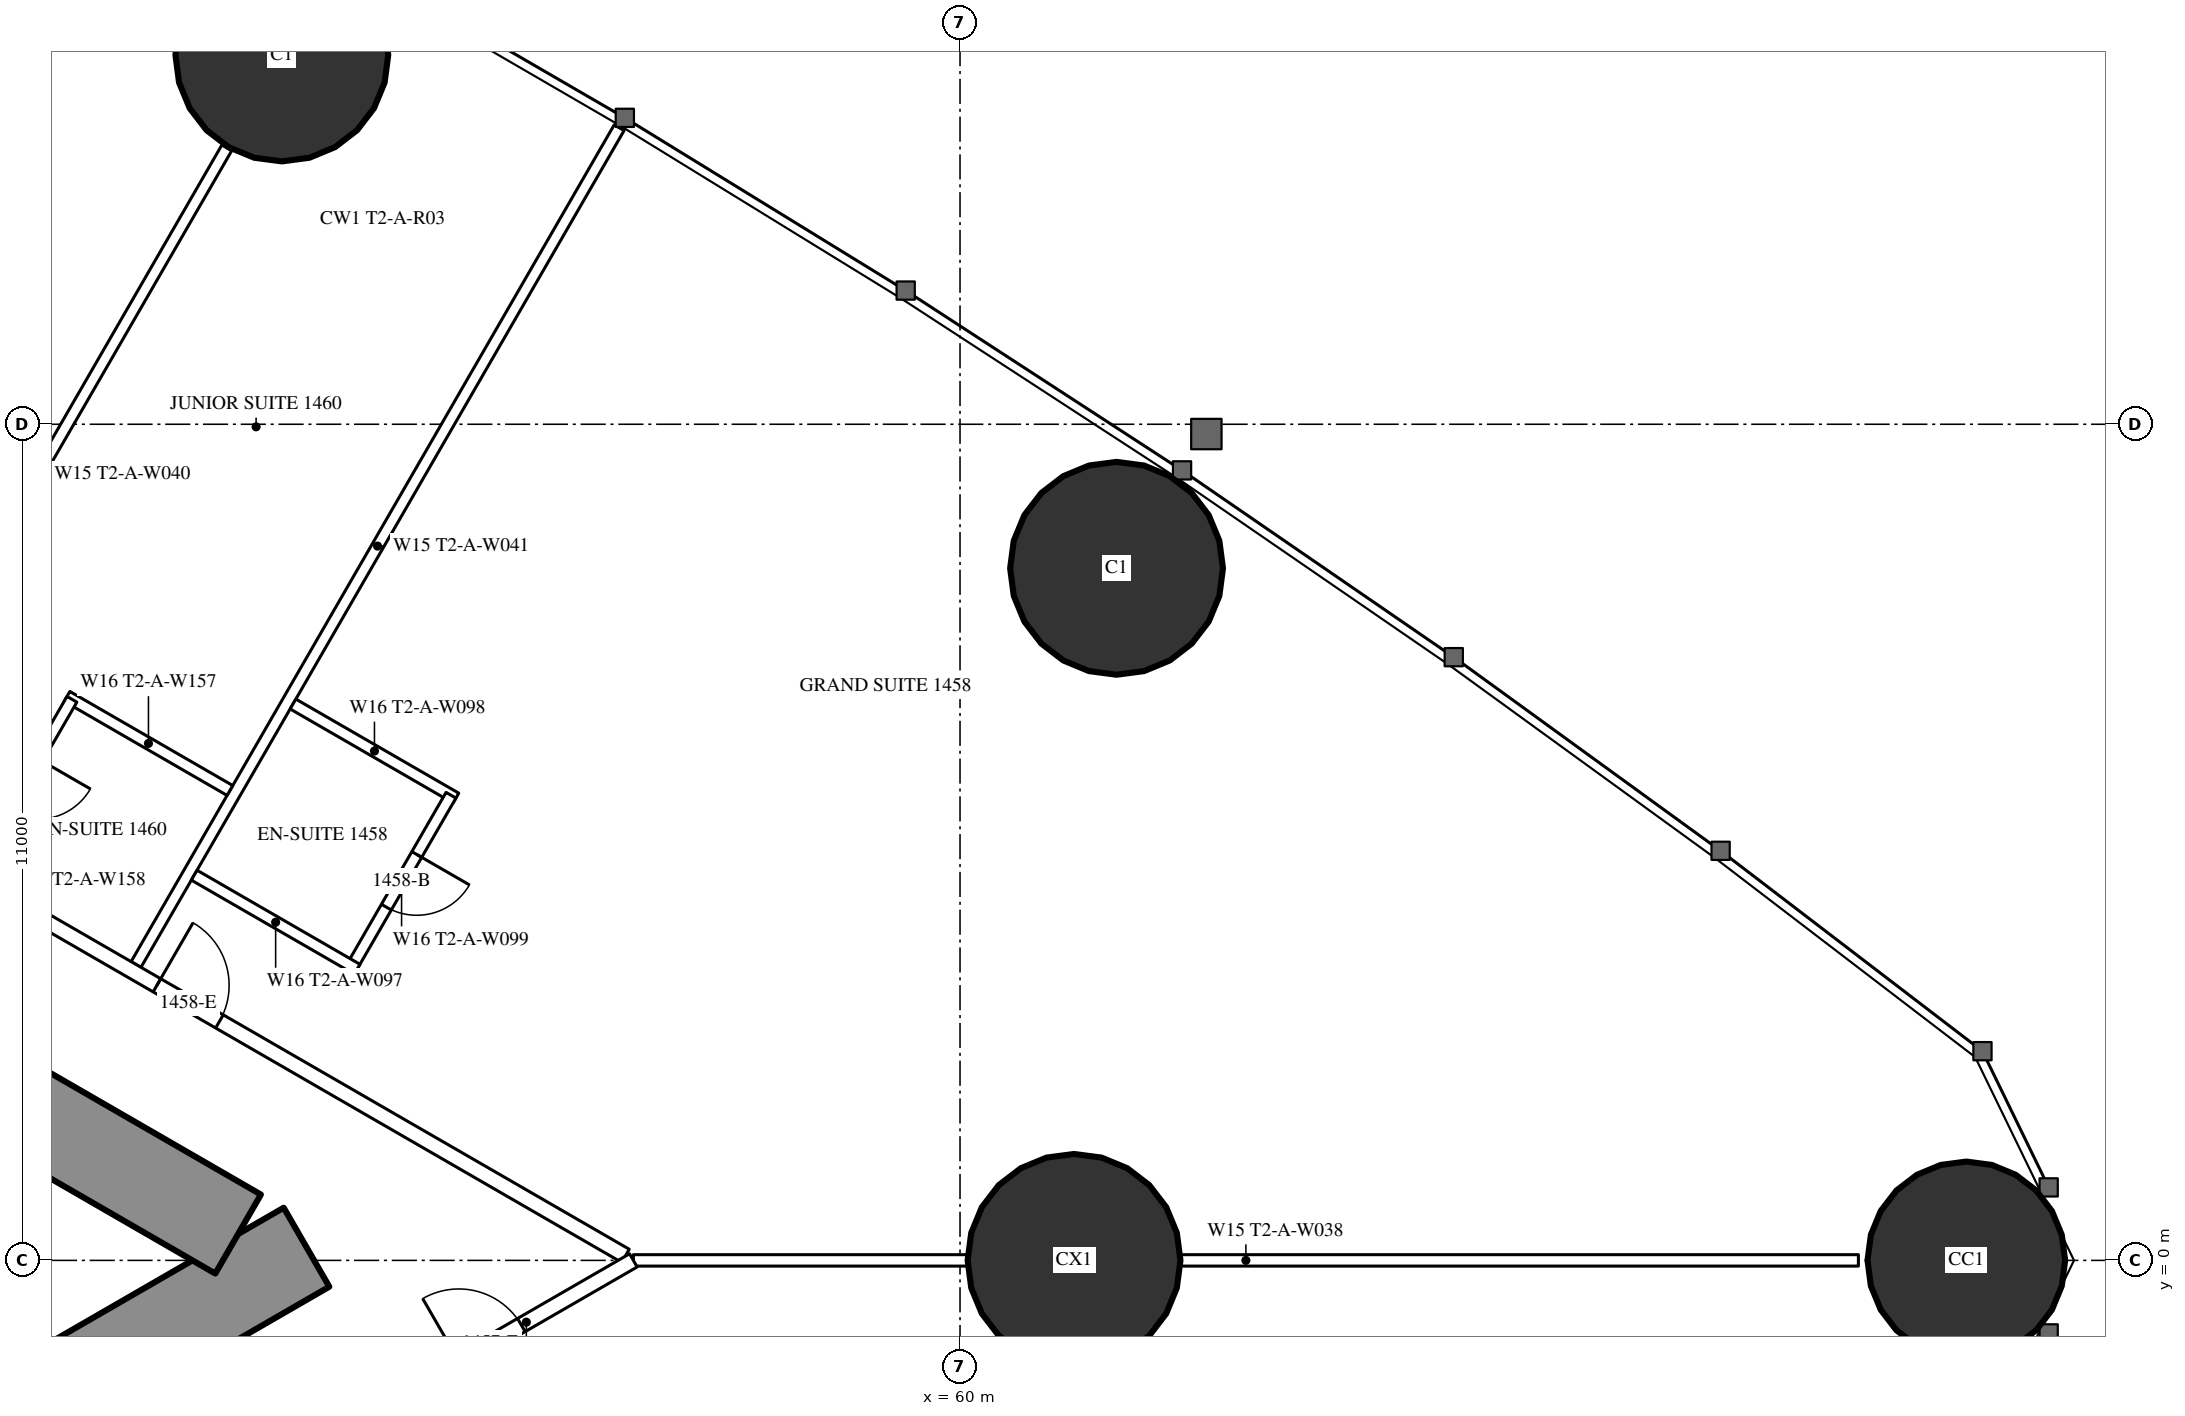
"""IFC4 building model, lengths in metres.
Left out: names, types, materials, properties, quantities, classifications, styles, units other than length and angle.
Written with IfcOpenShell. Run it as: python <this file> out.ifc"""

import sys

from ifc_helpers import new_model, si_unit, direction, frame, frame_2d, origin, origin_2d, place, context, subcontext, project, spatial, rectangle, hollow_circle, extrude, element, fill, save


model = new_model("IFC4")
c1 = context("Model", 3, precision=1e-05, world=origin(), true_north=direction((0.0, 1.0)))
c2 = subcontext(c1, "Body", "Model", "MODEL_VIEW")
j1 = project(units=[si_unit("LENGTHUNIT", "METRE"), si_unit("PLANEANGLEUNIT", "RADIAN")], contexts=[c1])
p1 = place(None, origin())
s1 = spatial("IfcSite", under=j1, at=p1, CompositionType="ELEMENT")
p2 = place(p1, origin())
s2 = spatial("IfcBuilding", under=s1, at=p2, CompositionType="ELEMENT")
p3 = place(p2, frame((0.0, 0.0, 56.5)))
s3 = spatial("IfcBuildingStorey", under=s2, at=p3, CompositionType="ELEMENT", Elevation=56.5)
p4 = place(p3, frame((73.239, 0.0, 0.0), z_axis=(0.0, 0.0, 1.0), x_axis=(1.0, 0.0, 0.0)))
e1 = element("IfcColumn", 1, at=p4, inside=s3, PredefinedType="COLUMN", context=c2, shape_type="SweptSolid", body=[
    extrude(hollow_circle(Radius=1.3, WallThickness=0.1, at=origin_2d()), origin(), (0.0, 0.0, 1.0), 3.5),
])
for number, where, z_axis, x_axis in (
    (2, (62.059, 9.105, 0.0), (0.0, 0.0, 1.0), (1.0, 0.0, 0.0)),
    (3, (51.078, 15.858, 0.0), (0.0, 0.0, 1.0), (1.0, 0.0, 0.0)),
):
    element("IfcColumn", number, at=place(p3, frame(where, z_axis=z_axis, x_axis=x_axis)), inside=s3, PredefinedType="COLUMN", context=c2, shape_type="SweptSolid", body=[
        extrude(hollow_circle(Radius=1.4, WallThickness=0.12, at=origin_2d()), origin(), (0.0, 0.0, 1.0), 3.5),
    ])
p5 = place(p3, frame((61.5, 0.0, 0.0), z_axis=(0.0, 0.0, 1.0), x_axis=(1.0, 0.0, 0.0)))
e4 = element("IfcColumn", 4, at=p5, inside=s3, PredefinedType="COLUMN", context=c2, shape_type="SweptSolid", body=[
    extrude(hollow_circle(Radius=1.4, WallThickness=0.1, at=origin_2d()), origin(), (0.0, 0.0, 1.0), 3.5),
])
p6 = place(p3, frame((27.2, -13.8, 0.0), z_axis=(0.0, 0.0, 1.0), x_axis=(0.866027159892, 0.499996958321, 0.0)))
e5 = element("IfcWall", 5, at=p6, inside=s3, PredefinedType="SHEAR", context=c2, shape_type="SweptSolid", body=[
    extrude(rectangle(XDim=27.947, YDim=1.2, at=frame_2d((13.973, 0.0))), origin(), (0.0, 0.0, 1.0), 3.5),
])
p7 = place(p6, frame((4.6, 0.0, 0.0)))
e6 = element("IfcOpeningElement", 6, at=p7, cuts=e5, PredefinedType="OPENING", context=c2, shape_type="SweptSolid", body=[
    extrude(rectangle(XDim=1.0, YDim=2.2, at=frame_2d((0.5, 1.1))), frame((0.0, 0.61, 0.0), z_axis=(0.0, -1.0, 0.0), x_axis=(1.0, 0.0, 0.0)), (0.0, 0.0, 1.0), 1.22),
])
p8 = place(p6, frame((13.395, 0.0, 0.0)))
e7 = element("IfcOpeningElement", 7, at=p8, cuts=e5, PredefinedType="OPENING", context=c2, shape_type="SweptSolid", body=[
    extrude(rectangle(XDim=1.8, YDim=2.2, at=frame_2d((0.9, 1.1))), frame((0.0, 0.61, 0.0), z_axis=(0.0, -1.0, 0.0), x_axis=(1.0, 0.0, 0.0)), (0.0, 0.0, 1.0), 1.22),
])
p9 = place(p3, frame((27.2, 13.8, 0.0), z_axis=(0.0, 0.0, 1.0), x_axis=(0.866024515034, -0.500001539357, 0.0)))
e8 = element("IfcWall", 8, at=p9, inside=s3, PredefinedType="SHEAR", context=c2, shape_type="SweptSolid", body=[
    extrude(rectangle(XDim=26.907, YDim=1.2, at=frame_2d((13.454, 0.0))), origin(), (0.0, 0.0, 1.0), 3.5),
])
p10 = place(p9, frame((4.6, 0.0, 0.0)))
e9 = element("IfcOpeningElement", 9, at=p10, cuts=e8, PredefinedType="OPENING", context=c2, shape_type="SweptSolid", body=[
    extrude(rectangle(XDim=1.0, YDim=2.2, at=frame_2d((0.5, 1.1))), frame((0.0, 0.61, 0.0), z_axis=(0.0, -1.0, 0.0), x_axis=(1.0, 0.0, 0.0)), (0.0, 0.0, 1.0), 1.22),
])
p11 = place(p9, frame((13.395, 0.0, 0.0)))
e10 = element("IfcOpeningElement", 10, at=p11, cuts=e8, PredefinedType="OPENING", context=c2, shape_type="SweptSolid", body=[
    extrude(rectangle(XDim=1.8, YDim=2.2, at=frame_2d((0.9, 1.1))), frame((0.0, 0.61, 0.0), z_axis=(0.0, -1.0, 0.0), x_axis=(1.0, 0.0, 0.0)), (0.0, 0.0, 1.0), 1.22),
])
p12 = place(p3, frame((45.403, 6.062, 0.0), z_axis=(0.0, 0.0, 1.0), x_axis=(0.500013434677, 0.866017647131, 0.0)))
e11 = element("IfcWall", 11, at=p12, inside=s3, PredefinedType="PARTITIONING", context=c2, shape_type="SweptSolid", body=[
    extrude(rectangle(XDim=9.902, YDim=0.15, at=frame_2d((4.951, 0.0))), origin(), (0.0, 0.0, 1.0), 2.25),
])
p13 = place(p3, frame((49.159, 3.893, 0.0), z_axis=(0.0, 0.0, 1.0), x_axis=(0.499995664361, 0.866027906952, 0.0)))
e12 = element("IfcWall", 12, at=p13, inside=s3, PredefinedType="PARTITIONING", context=c2, shape_type="SweptSolid", body=[
    extrude(rectangle(XDim=12.711, YDim=0.15, at=frame_2d((6.356, 0.0))), origin(), (0.0, 0.0, 1.0), 3.25),
])
p14 = place(p3, frame((55.702, 0.0, 0.0), z_axis=(0.0, 0.0, 1.0), x_axis=(1.0, 0.0, 0.0)))
e13 = element("IfcWall", 13, at=p14, inside=s3, PredefinedType="PARTITIONING", context=c2, shape_type="SweptSolid", body=[
    extrude(rectangle(XDim=16.117, YDim=0.15, at=frame_2d((8.059, 0.0))), origin(), (0.0, 0.0, 1.0), 2.25),
])
p15 = place(p3, frame((36.834, 10.894, 0.0), z_axis=(0.0, 0.0, 1.0), x_axis=(0.866028157229, -0.499995230863, 0.0)))
e14 = element("IfcWall", 14, at=p15, inside=s3, PredefinedType="PARTITIONING", context=c2, shape_type="SweptSolid", body=[
    extrude(rectangle(XDim=21.667, YDim=0.2, at=frame_2d((10.833, 0.0))), origin(), (0.0, 0.0, 1.0), 3.25),
])
p16 = place(p15, frame((14.55, 0.0, 0.0)))
e15 = element("IfcOpeningElement", 15, at=p16, cuts=e14, PredefinedType="OPENING", context=c2, shape_type="SweptSolid", body=[
    extrude(rectangle(XDim=0.95, YDim=2.2, at=frame_2d((0.475, 1.1))), frame((0.0, 0.11, 0.0), z_axis=(0.0, -1.0, 0.0), x_axis=(1.0, 0.0, 0.0)), (0.0, 0.0, 1.0), 0.22),
])
p17 = place(p15, frame((10.5, 0.0, 0.0)))
e16 = element("IfcOpeningElement", 16, at=p17, cuts=e14, PredefinedType="OPENING", context=c2, shape_type="SweptSolid", body=[
    extrude(rectangle(XDim=0.95, YDim=2.2, at=frame_2d((0.475, 1.1))), frame((0.0, 0.11, 0.0), z_axis=(0.0, -1.0, 0.0), x_axis=(1.0, 0.0, 0.0)), (0.0, 0.0, 1.0), 0.22),
])
p18 = place(p15, frame((4.292, 0.0, 0.0)))
e17 = element("IfcOpeningElement", 17, at=p18, cuts=e14, PredefinedType="OPENING", context=c2, shape_type="SweptSolid", body=[
    extrude(rectangle(XDim=1.0, YDim=2.2, at=frame_2d((0.5, 1.1))), frame((0.0, 0.11, 0.0), z_axis=(0.0, -1.0, 0.0), x_axis=(1.0, 0.0, 0.0)), (0.0, 0.0, 1.0), 0.22),
])
p19 = place(p15, frame((0.246, 0.0, 0.0)))
e18 = element("IfcOpeningElement", 18, at=p19, cuts=e14, PredefinedType="OPENING", context=c2, shape_type="SweptSolid", body=[
    extrude(rectangle(XDim=0.9, YDim=2.2, at=frame_2d((0.45, 1.1))), frame((0.0, 0.11, 0.0), z_axis=(0.0, -1.0, 0.0), x_axis=(1.0, 0.0, 0.0)), (0.0, 0.0, 1.0), 0.22),
])
p20 = place(p3, frame((52.886, -1.626, 0.0), z_axis=(0.0, 0.0, 1.0), x_axis=(0.866030540913, 0.499991102127, 0.0)))
e19 = element("IfcWall", 19, at=p20, inside=s3, PredefinedType="PARTITIONING", context=c2, shape_type="SweptSolid", body=[
    extrude(rectangle(XDim=3.251, YDim=0.2, at=frame_2d((1.626, 0.0))), origin(), (0.0, 0.0, 1.0), 3.25),
])
p21 = place(p20, frame((0.6, 0.0, 0.0)))
e20 = element("IfcOpeningElement", 20, at=p21, cuts=e19, PredefinedType="OPENING", context=c2, shape_type="SweptSolid", body=[
    extrude(rectangle(XDim=0.95, YDim=2.2, at=frame_2d((0.475, 1.1))), frame((0.0, 0.11, 0.0), z_axis=(0.0, -1.0, 0.0), x_axis=(1.0, 0.0, 0.0)), (0.0, 0.0, 1.0), 0.22),
])
p22 = place(p3, frame((51.224, 7.32, 0.0), z_axis=(0.0, 0.0, 1.0), x_axis=(0.866031185235, -0.4999899861, 0.0)))
e21 = element("IfcWall", 21, at=p22, inside=s3, PredefinedType="PARTITIONING", context=c2, shape_type="SweptSolid", body=[
    extrude(rectangle(XDim=2.475, YDim=0.15, at=frame_2d((1.238, 0.0))), origin(), (0.0, 0.0, 1.0), 3.25),
])
p23 = place(p3, frame((52.003, 3.868, 0.0), z_axis=(0.0, 0.0, 1.0), x_axis=(0.500047596559, 0.865997922154, 0.0)))
e22 = element("IfcWall", 22, at=p23, inside=s3, PredefinedType="PARTITIONING", context=c2, shape_type="SweptSolid", body=[
    extrude(rectangle(XDim=2.6, YDim=0.15, at=frame_2d((1.3, 0.0))), origin(), (0.0, 0.0, 1.0), 3.25),
])
p24 = place(p23, frame((0.9, 0.0, 0.0)))
e23 = element("IfcOpeningElement", 23, at=p24, cuts=e22, PredefinedType="OPENING", context=c2, shape_type="SweptSolid", body=[
    extrude(rectangle(XDim=0.8, YDim=2.2, at=frame_2d((0.4, 1.1))), frame((0.0, 0.085, 0.0), z_axis=(0.0, -1.0, 0.0), x_axis=(1.0, 0.0, 0.0)), (0.0, 0.0, 1.0), 0.17),
])
for number, where, z_axis, x_axis in (
    (24, (49.925, 5.068, 0.0), (0.0, 0.0, 1.0), (0.866, -0.5, 0.0)),
    (25, (48.251, 7.42, 0.0), (0.0, 0.0, 1.0), (0.866, -0.5, 0.0)),
):
    element("IfcWall", number, at=place(p3, frame(where, z_axis=z_axis, x_axis=x_axis)), inside=s3, PredefinedType="PARTITIONING", context=c2, shape_type="SweptSolid", body=[
        extrude(rectangle(XDim=2.475, YDim=0.15, at=frame_2d((1.237, 0.0))), origin(), (0.0, 0.0, 1.0), 3.25),
    ])
p25 = place(p3, frame((47.016, 5.13, 0.0), z_axis=(0.0, 0.0, 1.0), x_axis=(0.500006934395, 0.866021400173, 0.0)))
e26 = element("IfcWall", 26, at=p25, inside=s3, PredefinedType="PARTITIONING", context=c2, shape_type="SweptSolid", body=[
    extrude(rectangle(XDim=2.6, YDim=0.15, at=frame_2d((1.3, 0.0))), origin(), (0.0, 0.0, 1.0), 3.25),
])
p26 = place(p25, frame((0.9, 0.0, 0.0)))
e27 = element("IfcOpeningElement", 27, at=p26, cuts=e26, PredefinedType="OPENING", context=c2, shape_type="SweptSolid", body=[
    extrude(rectangle(XDim=0.8, YDim=2.2, at=frame_2d((0.4, 1.1))), frame((0.0, 0.085, 0.0), z_axis=(0.0, -1.0, 0.0), x_axis=(1.0, 0.0, 0.0)), (0.0, 0.0, 1.0), 0.17),
])
p27 = place(p21, origin())
e28 = element("IfcDoor", 28, at=p27, inside=s3, OperationType="SINGLE_SWING_LEFT", PredefinedType="DOOR", context=c2, shape_type="SweptSolid", body=[
    extrude(rectangle(XDim=0.95, YDim=2.2, at=frame_2d((0.475, 1.1))), frame((0.0, 0.025, 0.0), z_axis=(0.0, -1.0, 0.0), x_axis=(1.0, 0.0, 0.0)), (0.0, 0.0, 1.0), 0.05),
])
fill(e20, e28)
p28 = place(p24, origin())
e29 = element("IfcDoor", 29, at=p28, inside=s3, OperationType="SINGLE_SWING_RIGHT", PredefinedType="DOOR", context=c2, shape_type="SweptSolid", body=[
    extrude(rectangle(XDim=0.8, YDim=2.2, at=frame_2d((0.4, 1.1))), frame((0.0, 0.025, 0.0), z_axis=(0.0, -1.0, 0.0), x_axis=(1.0, 0.0, 0.0)), (0.0, 0.0, 1.0), 0.05),
])
fill(e23, e29)
p29 = place(p16, origin())
e30 = element("IfcDoor", 30, at=p29, inside=s3, OperationType="SINGLE_SWING_LEFT", PredefinedType="DOOR", context=c2, shape_type="SweptSolid", body=[
    extrude(rectangle(XDim=0.95, YDim=2.2, at=frame_2d((0.475, 1.1))), frame((0.0, 0.025, 0.0), z_axis=(0.0, -1.0, 0.0), x_axis=(1.0, 0.0, 0.0)), (0.0, 0.0, 1.0), 0.05),
])
fill(e15, e30)
save(model, sys.argv[1])
